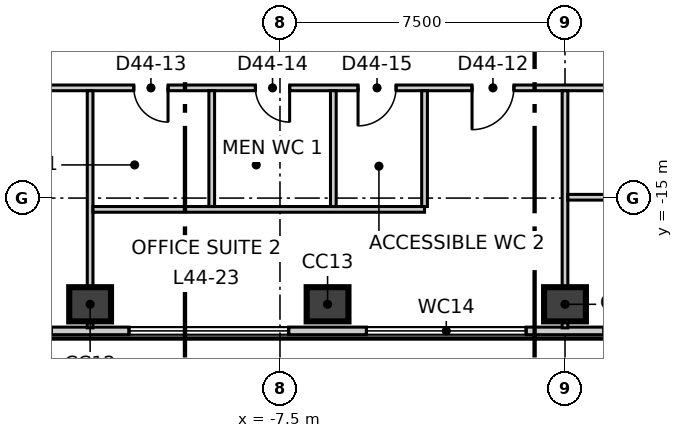
"""IFC4 building model, lengths in metres.
Left out: names, types, materials, properties, quantities, classifications, styles, units other than length and angle.
Written with IfcOpenShell. Run it as: python <this file> out.ifc"""

import sys

from ifc_helpers import new_model, si_unit, direction, frame, frame_2d, origin, origin_2d, place, context, subcontext, project, spatial, rectangle, extrude, element, fill, save


model = new_model("IFC4")
c1 = context("Model", 3, precision=1e-05, world=origin(), true_north=direction((0.0, 1.0)))
c2 = subcontext(c1, "Body", "Model", "MODEL_VIEW")
j1 = project(units=[si_unit("LENGTHUNIT", "METRE"), si_unit("PLANEANGLEUNIT", "RADIAN")], contexts=[c1])
p1 = place(None, origin())
s1 = spatial("IfcSite", under=j1, at=p1, CompositionType="ELEMENT")
p2 = place(p1, origin())
s2 = spatial("IfcBuilding", under=s1, at=p2, CompositionType="ELEMENT")
p3 = place(p2, frame((0.0, 0.0, 191.3)))
s3 = spatial("IfcBuildingStorey", under=s2, at=p3, CompositionType="ELEMENT", Elevation=191.3)
for number, where, z_axis, x_axis in (
    (1, (-12.496, -17.795, -0.3), (0.0, 0.0, 1.0), (1.0, 0.0, 0.0)),
    (2, (-6.248, -17.795, -0.3), (0.0, 0.0, 1.0), (1.0, 0.0, 0.0)),
    (3, (0.0, -17.795, -0.3), (0.0, 0.0, 1.0), (1.0, 0.0, 0.0)),
):
    element("IfcColumn", number, at=place(p3, frame(where, z_axis=z_axis, x_axis=x_axis)), inside=s3, PredefinedType="COLUMN", context=c2, shape_type="SweptSolid", body=[
        extrude(rectangle(XDim=1.1, YDim=0.9, at=origin_2d()), origin(), (0.0, 0.0, 1.0), 4.0),
    ])
p4 = place(p3, frame((-2.869, 32.02, 0.0), z_axis=(0.0, 0.0, 1.0), x_axis=(-0.500006930241, -0.866021402571, 0.0)))
e4 = element("IfcWall", 4, at=p4, inside=s3, PredefinedType="ELEMENTEDWALL", context=c2, shape_type="SweptSolid", body=[
    extrude(rectangle(XDim=52.572, YDim=0.2, at=frame_2d((26.286, 0.0))), origin(), (0.0, 0.0, 1.0), 3.7),
])
p5 = place(p4, frame((2.327, 0.0, 0.9)))
e5 = element("IfcOpeningElement", 5, at=p5, cuts=e4, PredefinedType="OPENING", context=c2, shape_type="SweptSolid", body=[
    extrude(rectangle(XDim=4.2, YDim=2.5, at=frame_2d((2.1, 1.25))), frame((0.0, 0.11, 0.0), z_axis=(0.0, -1.0, 0.0), x_axis=(1.0, 0.0, 0.0)), (0.0, 0.0, 1.0), 0.22),
])
p6 = place(p4, frame((8.575, 0.0, 0.9)))
e6 = element("IfcOpeningElement", 6, at=p6, cuts=e4, PredefinedType="OPENING", context=c2, shape_type="SweptSolid", body=[
    extrude(rectangle(XDim=4.2, YDim=2.5, at=frame_2d((2.1, 1.25))), frame((0.0, 0.11, 0.0), z_axis=(0.0, -1.0, 0.0), x_axis=(1.0, 0.0, 0.0)), (0.0, 0.0, 1.0), 0.22),
])
p7 = place(p4, frame((14.823, 0.0, 0.9)))
e7 = element("IfcOpeningElement", 7, at=p7, cuts=e4, PredefinedType="OPENING", context=c2, shape_type="SweptSolid", body=[
    extrude(rectangle(XDim=4.2, YDim=2.5, at=frame_2d((2.1, 1.25))), frame((0.0, 0.11, 0.0), z_axis=(0.0, -1.0, 0.0), x_axis=(1.0, 0.0, 0.0)), (0.0, 0.0, 1.0), 0.22),
])
p8 = place(p4, frame((21.071, 0.0, 0.9)))
e8 = element("IfcOpeningElement", 8, at=p8, cuts=e4, PredefinedType="OPENING", context=c2, shape_type="SweptSolid", body=[
    extrude(rectangle(XDim=4.2, YDim=2.5, at=frame_2d((2.1, 1.25))), frame((0.0, 0.11, 0.0), z_axis=(0.0, -1.0, 0.0), x_axis=(1.0, 0.0, 0.0)), (0.0, 0.0, 1.0), 0.22),
])
p9 = place(p4, frame((27.319, 0.0, 0.9)))
e9 = element("IfcOpeningElement", 9, at=p9, cuts=e4, PredefinedType="OPENING", context=c2, shape_type="SweptSolid", body=[
    extrude(rectangle(XDim=4.2, YDim=2.5, at=frame_2d((2.1, 1.25))), frame((0.0, 0.11, 0.0), z_axis=(0.0, -1.0, 0.0), x_axis=(1.0, 0.0, 0.0)), (0.0, 0.0, 1.0), 0.22),
])
p10 = place(p4, frame((33.568, 0.0, 0.9)))
e10 = element("IfcOpeningElement", 10, at=p10, cuts=e4, PredefinedType="OPENING", context=c2, shape_type="SweptSolid", body=[
    extrude(rectangle(XDim=4.2, YDim=2.5, at=frame_2d((2.1, 1.25))), frame((0.0, 0.11, 0.0), z_axis=(0.0, -1.0, 0.0), x_axis=(1.0, 0.0, 0.0)), (0.0, 0.0, 1.0), 0.22),
])
p11 = place(p4, frame((39.816, 0.0, 0.9)))
e11 = element("IfcOpeningElement", 11, at=p11, cuts=e4, PredefinedType="OPENING", context=c2, shape_type="SweptSolid", body=[
    extrude(rectangle(XDim=4.2, YDim=2.5, at=frame_2d((2.1, 1.25))), frame((0.0, 0.11, 0.0), z_axis=(0.0, -1.0, 0.0), x_axis=(1.0, 0.0, 0.0)), (0.0, 0.0, 1.0), 0.22),
])
p12 = place(p4, frame((46.064, 0.0, 0.9)))
e12 = element("IfcOpeningElement", 12, at=p12, cuts=e4, PredefinedType="OPENING", context=c2, shape_type="SweptSolid", body=[
    extrude(rectangle(XDim=4.2, YDim=2.5, at=frame_2d((2.1, 1.25))), frame((0.0, 0.11, 0.0), z_axis=(0.0, -1.0, 0.0), x_axis=(1.0, 0.0, 0.0)), (0.0, 0.0, 1.0), 0.22),
])
p13 = place(p3, frame((-26.296, -18.495, 0.0), z_axis=(0.0, 0.0, 1.0), x_axis=(1.0, 0.0, 0.0)))
e13 = element("IfcWall", 13, at=p13, inside=s3, PredefinedType="ELEMENTEDWALL", context=c2, shape_type="SweptSolid", body=[
    extrude(rectangle(XDim=52.572, YDim=0.2, at=frame_2d((26.286, 0.0))), origin(), (0.0, 0.0, 1.0), 3.7),
])
p14 = place(p13, frame((2.327, 0.0, 0.9)))
e14 = element("IfcOpeningElement", 14, at=p14, cuts=e13, PredefinedType="OPENING", context=c2, shape_type="SweptSolid", body=[
    extrude(rectangle(XDim=4.2, YDim=2.5, at=frame_2d((2.1, 1.25))), frame((0.0, 0.11, 0.0), z_axis=(0.0, -1.0, 0.0), x_axis=(1.0, 0.0, 0.0)), (0.0, 0.0, 1.0), 0.22),
])
p15 = place(p13, frame((8.575, 0.0, 0.9)))
e15 = element("IfcOpeningElement", 15, at=p15, cuts=e13, PredefinedType="OPENING", context=c2, shape_type="SweptSolid", body=[
    extrude(rectangle(XDim=4.2, YDim=2.5, at=frame_2d((2.1, 1.25))), frame((0.0, 0.11, 0.0), z_axis=(0.0, -1.0, 0.0), x_axis=(1.0, 0.0, 0.0)), (0.0, 0.0, 1.0), 0.22),
])
p16 = place(p13, frame((14.824, 0.0, 0.9)))
e16 = element("IfcOpeningElement", 16, at=p16, cuts=e13, PredefinedType="OPENING", context=c2, shape_type="SweptSolid", body=[
    extrude(rectangle(XDim=4.2, YDim=2.5, at=frame_2d((2.1, 1.25))), frame((0.0, 0.11, 0.0), z_axis=(0.0, -1.0, 0.0), x_axis=(1.0, 0.0, 0.0)), (0.0, 0.0, 1.0), 0.22),
])
p17 = place(p13, frame((21.072, 0.0, 0.9)))
e17 = element("IfcOpeningElement", 17, at=p17, cuts=e13, PredefinedType="OPENING", context=c2, shape_type="SweptSolid", body=[
    extrude(rectangle(XDim=4.2, YDim=2.5, at=frame_2d((2.1, 1.25))), frame((0.0, 0.11, 0.0), z_axis=(0.0, -1.0, 0.0), x_axis=(1.0, 0.0, 0.0)), (0.0, 0.0, 1.0), 0.22),
])
p18 = place(p13, frame((27.32, 0.0, 0.9)))
e18 = element("IfcOpeningElement", 18, at=p18, cuts=e13, PredefinedType="OPENING", context=c2, shape_type="SweptSolid", body=[
    extrude(rectangle(XDim=4.2, YDim=2.5, at=frame_2d((2.1, 1.25))), frame((0.0, 0.11, 0.0), z_axis=(0.0, -1.0, 0.0), x_axis=(1.0, 0.0, 0.0)), (0.0, 0.0, 1.0), 0.22),
])
p19 = place(p13, frame((33.568, 0.0, 0.9)))
e19 = element("IfcOpeningElement", 19, at=p19, cuts=e13, PredefinedType="OPENING", context=c2, shape_type="SweptSolid", body=[
    extrude(rectangle(XDim=4.2, YDim=2.5, at=frame_2d((2.1, 1.25))), frame((0.0, 0.11, 0.0), z_axis=(0.0, -1.0, 0.0), x_axis=(1.0, 0.0, 0.0)), (0.0, 0.0, 1.0), 0.22),
])
p20 = place(p13, frame((39.817, 0.0, 0.9)))
e20 = element("IfcOpeningElement", 20, at=p20, cuts=e13, PredefinedType="OPENING", context=c2, shape_type="SweptSolid", body=[
    extrude(rectangle(XDim=4.2, YDim=2.5, at=frame_2d((2.1, 1.25))), frame((0.0, 0.11, 0.0), z_axis=(0.0, -1.0, 0.0), x_axis=(1.0, 0.0, 0.0)), (0.0, 0.0, 1.0), 0.22),
])
p21 = place(p13, frame((46.065, 0.0, 0.9)))
e21 = element("IfcOpeningElement", 21, at=p21, cuts=e13, PredefinedType="OPENING", context=c2, shape_type="SweptSolid", body=[
    extrude(rectangle(XDim=4.2, YDim=2.5, at=frame_2d((2.1, 1.25))), frame((0.0, 0.11, 0.0), z_axis=(0.0, -1.0, 0.0), x_axis=(1.0, 0.0, 0.0)), (0.0, 0.0, 1.0), 0.22),
])
p22 = place(p3, frame((-20.882, -11.969, 0.0), z_axis=(0.0, 0.0, 1.0), x_axis=(0.499998738735, 0.866026131975, 0.0)))
e22 = element("IfcWall", 22, at=p22, inside=s3, PredefinedType="PARTITIONING", context=c2, shape_type="SweptSolid", body=[
    extrude(rectangle(XDim=41.764, YDim=0.15, at=frame_2d((20.882, 0.0))), origin(), (0.0, 0.0, 1.0), 3.7),
])
p23 = place(p22, frame((37.014, 0.0, 0.0)))
e23 = element("IfcOpeningElement", 23, at=p23, cuts=e22, PredefinedType="OPENING", context=c2, shape_type="SweptSolid", body=[
    extrude(rectangle(XDim=1.0, YDim=2.1, at=frame_2d((0.5, 1.05))), frame((0.0, 0.085, 0.0), z_axis=(0.0, -1.0, 0.0), x_axis=(1.0, 0.0, 0.0)), (0.0, 0.0, 1.0), 0.17),
])
p24 = place(p22, frame((29.653, 0.0, 0.0)))
e24 = element("IfcOpeningElement", 24, at=p24, cuts=e22, PredefinedType="OPENING", context=c2, shape_type="SweptSolid", body=[
    extrude(rectangle(XDim=1.0, YDim=2.1, at=frame_2d((0.5, 1.05))), frame((0.0, 0.085, 0.0), z_axis=(0.0, -1.0, 0.0), x_axis=(1.0, 0.0, 0.0)), (0.0, 0.0, 1.0), 0.17),
])
p25 = place(p22, frame((23.405, 0.0, 0.0)))
e25 = element("IfcOpeningElement", 25, at=p25, cuts=e22, PredefinedType="OPENING", context=c2, shape_type="SweptSolid", body=[
    extrude(rectangle(XDim=1.0, YDim=2.1, at=frame_2d((0.5, 1.05))), frame((0.0, 0.085, 0.0), z_axis=(0.0, -1.0, 0.0), x_axis=(1.0, 0.0, 0.0)), (0.0, 0.0, 1.0), 0.17),
])
p26 = place(p22, frame((9.657, 0.0, 0.0)))
e26 = element("IfcOpeningElement", 26, at=p26, cuts=e22, PredefinedType="OPENING", context=c2, shape_type="SweptSolid", body=[
    extrude(rectangle(XDim=1.1, YDim=2.1, at=frame_2d((0.55, 1.05))), frame((0.0, 0.085, 0.0), z_axis=(0.0, -1.0, 0.0), x_axis=(1.0, 0.0, 0.0)), (0.0, 0.0, 1.0), 0.17),
])
p27 = place(p22, frame((18.757, 0.0, 0.0)))
e27 = element("IfcOpeningElement", 27, at=p27, cuts=e22, PredefinedType="OPENING", context=c2, shape_type="SweptSolid", body=[
    extrude(rectangle(XDim=0.9, YDim=2.1, at=frame_2d((0.45, 1.05))), frame((0.0, 0.085, 0.0), z_axis=(0.0, -1.0, 0.0), x_axis=(1.0, 0.0, 0.0)), (0.0, 0.0, 1.0), 0.17),
])
p28 = place(p22, frame((15.557, 0.0, 0.0)))
e28 = element("IfcOpeningElement", 28, at=p28, cuts=e22, PredefinedType="OPENING", context=c2, shape_type="SweptSolid", body=[
    extrude(rectangle(XDim=0.9, YDim=2.1, at=frame_2d((0.45, 1.05))), frame((0.0, 0.085, 0.0), z_axis=(0.0, -1.0, 0.0), x_axis=(1.0, 0.0, 0.0)), (0.0, 0.0, 1.0), 0.17),
])
p29 = place(p22, frame((12.657, 0.0, 0.0)))
e29 = element("IfcOpeningElement", 29, at=p29, cuts=e22, PredefinedType="OPENING", context=c2, shape_type="SweptSolid", body=[
    extrude(rectangle(XDim=1.0, YDim=2.1, at=frame_2d((0.5, 1.05))), frame((0.0, 0.085, 0.0), z_axis=(0.0, -1.0, 0.0), x_axis=(1.0, 0.0, 0.0)), (0.0, 0.0, 1.0), 0.17),
])
p30 = place(p22, frame((3.56, 0.0, 0.0)))
e30 = element("IfcOpeningElement", 30, at=p30, cuts=e22, PredefinedType="OPENING", context=c2, shape_type="SweptSolid", body=[
    extrude(rectangle(XDim=1.1, YDim=2.1, at=frame_2d((0.55, 1.05))), frame((0.0, 0.085, 0.0), z_axis=(0.0, -1.0, 0.0), x_axis=(1.0, 0.0, 0.0)), (0.0, 0.0, 1.0), 0.17),
])
p31 = place(p3, frame((-20.808, -12.1, 0.0), z_axis=(0.0, 0.0, 1.0), x_axis=(1.0, 0.0, 0.0)))
e31 = element("IfcWall", 31, at=p31, inside=s3, PredefinedType="PARTITIONING", context=c2, shape_type="SweptSolid", body=[
    extrude(rectangle(XDim=41.766, YDim=0.15, at=frame_2d((20.883, 0.0))), origin(), (0.0, 0.0, 1.0), 3.7),
])
p32 = place(p31, frame((3.5, 0.0, 0.0)))
e32 = element("IfcOpeningElement", 32, at=p32, cuts=e31, PredefinedType="OPENING", context=c2, shape_type="SweptSolid", body=[
    extrude(rectangle(XDim=1.1, YDim=2.1, at=frame_2d((0.55, 1.05))), frame((0.0, 0.085, 0.0), z_axis=(0.0, -1.0, 0.0), x_axis=(1.0, 0.0, 0.0)), (0.0, 0.0, 1.0), 0.17),
])
p33 = place(p31, frame((18.362, 0.0, 0.0)))
e33 = element("IfcOpeningElement", 33, at=p33, cuts=e31, PredefinedType="OPENING", context=c2, shape_type="SweptSolid", body=[
    extrude(rectangle(XDim=1.1, YDim=2.1, at=frame_2d((0.55, 1.05))), frame((0.0, 0.085, 0.0), z_axis=(0.0, -1.0, 0.0), x_axis=(1.0, 0.0, 0.0)), (0.0, 0.0, 1.0), 0.17),
])
p34 = place(p31, frame((9.462, 0.0, 0.0)))
e34 = element("IfcOpeningElement", 34, at=p34, cuts=e31, PredefinedType="OPENING", context=c2, shape_type="SweptSolid", body=[
    extrude(rectangle(XDim=0.9, YDim=2.1, at=frame_2d((0.45, 1.05))), frame((0.0, 0.085, 0.0), z_axis=(0.0, -1.0, 0.0), x_axis=(1.0, 0.0, 0.0)), (0.0, 0.0, 1.0), 0.17),
])
p35 = place(p31, frame((12.662, 0.0, 0.0)))
e35 = element("IfcOpeningElement", 35, at=p35, cuts=e31, PredefinedType="OPENING", context=c2, shape_type="SweptSolid", body=[
    extrude(rectangle(XDim=0.9, YDim=2.1, at=frame_2d((0.45, 1.05))), frame((0.0, 0.085, 0.0), z_axis=(0.0, -1.0, 0.0), x_axis=(1.0, 0.0, 0.0)), (0.0, 0.0, 1.0), 0.17),
])
p36 = place(p31, frame((15.362, 0.0, 0.0)))
e36 = element("IfcOpeningElement", 36, at=p36, cuts=e31, PredefinedType="OPENING", context=c2, shape_type="SweptSolid", body=[
    extrude(rectangle(XDim=1.0, YDim=2.1, at=frame_2d((0.5, 1.05))), frame((0.0, 0.085, 0.0), z_axis=(0.0, -1.0, 0.0), x_axis=(1.0, 0.0, 0.0)), (0.0, 0.0, 1.0), 0.17),
])
p37 = place(p31, frame((26.458, 0.0, 0.0)))
e37 = element("IfcOpeningElement", 37, at=p37, cuts=e31, PredefinedType="OPENING", context=c2, shape_type="SweptSolid", body=[
    extrude(rectangle(XDim=1.1, YDim=2.1, at=frame_2d((0.55, 1.05))), frame((0.0, 0.085, 0.0), z_axis=(0.0, -1.0, 0.0), x_axis=(1.0, 0.0, 0.0)), (0.0, 0.0, 1.0), 0.17),
])
p38 = place(p31, frame((36.955, 0.0, 0.0)))
e38 = element("IfcOpeningElement", 38, at=p38, cuts=e31, PredefinedType="OPENING", context=c2, shape_type="SweptSolid", body=[
    extrude(rectangle(XDim=1.1, YDim=2.1, at=frame_2d((0.55, 1.05))), frame((0.0, 0.085, 0.0), z_axis=(0.0, -1.0, 0.0), x_axis=(1.0, 0.0, 0.0)), (0.0, 0.0, 1.0), 0.17),
])
p39 = place(p3, frame((-12.496, -18.415, 0.0), z_axis=(0.0, 0.0, 1.0), x_axis=(0.0, 1.0, 0.0)))
e39 = element("IfcWall", 39, at=p39, inside=s3, PredefinedType="PARTITIONING", context=c2, shape_type="SweptSolid", body=[
    extrude(rectangle(XDim=6.24, YDim=0.15, at=frame_2d((3.12, 0.0))), origin(), (0.0, 0.0, 1.0), 3.7),
])
p40 = place(p3, frame((-12.421, -15.297, 0.0), z_axis=(0.0, 0.0, 1.0), x_axis=(1.0, 0.0, 0.0)))
e40 = element("IfcWall", 40, at=p40, inside=s3, PredefinedType="PARTITIONING", context=c2, shape_type="SweptSolid", body=[
    extrude(rectangle(XDim=8.725, YDim=0.15, at=frame_2d((4.362, 0.0))), origin(), (0.0, 0.0, 1.0), 3.7),
])
for number, where, z_axis, x_axis in (
    (41, (-9.296, -15.222, 0.0), (0.0, 0.0, 1.0), (0.0, 1.0, 0.0)),
    (42, (-3.696, -15.222, 0.0), (0.0, 0.0, 1.0), (0.0, 1.0, 0.0)),
    (43, (-6.096, -15.222, 0.0), (0.0, 0.0, 1.0), (0.0, 1.0, 0.0)),
):
    element("IfcWall", number, at=place(p3, frame(where, z_axis=z_axis, x_axis=x_axis)), inside=s3, PredefinedType="PARTITIONING", context=c2, shape_type="SweptSolid", body=[
        extrude(rectangle(XDim=3.047, YDim=0.15, at=frame_2d((1.523, 0.0))), origin(), (0.0, 0.0, 1.0), 3.7),
    ])
p41 = place(p3, frame((0.0, -18.415, 0.0), z_axis=(0.0, 0.0, 1.0), x_axis=(0.0, 1.0, 0.0)))
e44 = element("IfcWall", 44, at=p41, inside=s3, PredefinedType="PARTITIONING", context=c2, shape_type="SweptSolid", body=[
    extrude(rectangle(XDim=6.24, YDim=0.15, at=frame_2d((3.12, 0.0))), origin(), (0.0, 0.0, 1.0), 3.2),
])
p42 = place(p3, frame((0.075, 24.07, 0.0), z_axis=(0.0, 0.0, 1.0), x_axis=(0.49999939571, -0.866025752671, 0.0)))
e45 = element("IfcWall", 45, at=p42, inside=s3, PredefinedType="PARTITIONING", context=c2, shape_type="SweptSolid", body=[
    extrude(rectangle(XDim=41.614, YDim=0.15, at=frame_2d((20.807, 0.0))), origin(), (0.0, 0.0, 1.0), 3.7),
])
p43 = place(p42, frame((37.015, 0.0, 0.0)))
e46 = element("IfcOpeningElement", 46, at=p43, cuts=e45, PredefinedType="OPENING", context=c2, shape_type="SweptSolid", body=[
    extrude(rectangle(XDim=1.1, YDim=2.1, at=frame_2d((0.55, 1.05))), frame((0.0, 0.085, 0.0), z_axis=(0.0, -1.0, 0.0), x_axis=(1.0, 0.0, 0.0)), (0.0, 0.0, 1.0), 0.17),
])
p44 = place(p42, frame((25.154, 0.0, 0.0)))
e47 = element("IfcOpeningElement", 47, at=p44, cuts=e45, PredefinedType="OPENING", context=c2, shape_type="SweptSolid", body=[
    extrude(rectangle(XDim=1.0, YDim=2.1, at=frame_2d((0.5, 1.05))), frame((0.0, 0.085, 0.0), z_axis=(0.0, -1.0, 0.0), x_axis=(1.0, 0.0, 0.0)), (0.0, 0.0, 1.0), 0.17),
])
p45 = place(p42, frame((31.454, 0.0, 0.0)))
e48 = element("IfcOpeningElement", 48, at=p45, cuts=e45, PredefinedType="OPENING", context=c2, shape_type="SweptSolid", body=[
    extrude(rectangle(XDim=0.9, YDim=2.1, at=frame_2d((0.45, 1.05))), frame((0.0, 0.085, 0.0), z_axis=(0.0, -1.0, 0.0), x_axis=(1.0, 0.0, 0.0)), (0.0, 0.0, 1.0), 0.17),
])
p46 = place(p42, frame((17.157, 0.0, 0.0)))
e49 = element("IfcOpeningElement", 49, at=p46, cuts=e45, PredefinedType="OPENING", context=c2, shape_type="SweptSolid", body=[
    extrude(rectangle(XDim=1.0, YDim=2.1, at=frame_2d((0.5, 1.05))), frame((0.0, 0.085, 0.0), z_axis=(0.0, -1.0, 0.0), x_axis=(1.0, 0.0, 0.0)), (0.0, 0.0, 1.0), 0.17),
])
p47 = place(p42, frame((6.609, 0.0, 0.0)))
e50 = element("IfcOpeningElement", 50, at=p47, cuts=e45, PredefinedType="OPENING", context=c2, shape_type="SweptSolid", body=[
    extrude(rectangle(XDim=1.1, YDim=2.1, at=frame_2d((0.55, 1.05))), frame((0.0, 0.085, 0.0), z_axis=(0.0, -1.0, 0.0), x_axis=(1.0, 0.0, 0.0)), (0.0, 0.0, 1.0), 0.17),
])
p48 = place(p3, frame((0.075, -14.978, 0.0), z_axis=(0.0, 0.0, 1.0), x_axis=(1.0, 0.0, 0.0)))
e51 = element("IfcWall", 51, at=p48, inside=s3, PredefinedType="PARTITIONING", context=c2, shape_type="SweptSolid", body=[
    extrude(rectangle(XDim=12.347, YDim=0.15, at=frame_2d((6.174, 0.0))), origin(), (0.0, 0.0, 1.0), 3.7),
])
p49 = place(p48, frame((5.675, 0.0, 0.0)))
e52 = element("IfcOpeningElement", 52, at=p49, cuts=e51, PredefinedType="OPENING", context=c2, shape_type="SweptSolid", body=[
    extrude(rectangle(XDim=1.0, YDim=2.1, at=frame_2d((0.5, 1.05))), frame((0.0, 0.085, 0.0), z_axis=(0.0, -1.0, 0.0), x_axis=(1.0, 0.0, 0.0)), (0.0, 0.0, 1.0), 0.17),
])
p50 = place(p16, origin())
e53 = element("IfcWindow", 53, at=p50, inside=s3, PartitioningType="SINGLE_PANEL", PredefinedType="WINDOW", context=c2, shape_type="SweptSolid", body=[
    extrude(rectangle(XDim=4.2, YDim=2.5, at=frame_2d((2.1, 1.25))), frame((0.0, 0.03, 0.0), z_axis=(0.0, -1.0, 0.0), x_axis=(1.0, 0.0, 0.0)), (0.0, 0.0, 1.0), 0.06),
])
fill(e16, e53)
p51 = place(p17, origin())
e54 = element("IfcWindow", 54, at=p51, inside=s3, PartitioningType="SINGLE_PANEL", PredefinedType="WINDOW", context=c2, shape_type="SweptSolid", body=[
    extrude(rectangle(XDim=4.2, YDim=2.5, at=frame_2d((2.1, 1.25))), frame((0.0, 0.03, 0.0), z_axis=(0.0, -1.0, 0.0), x_axis=(1.0, 0.0, 0.0)), (0.0, 0.0, 1.0), 0.06),
])
fill(e17, e54)
p52 = place(p33, origin())
e55 = element("IfcDoor", 55, at=p52, inside=s3, OperationType="SINGLE_SWING_LEFT", PredefinedType="DOOR", context=c2, shape_type="SweptSolid", body=[
    extrude(rectangle(XDim=1.1, YDim=2.1, at=frame_2d((0.55, 1.05))), frame((0.0, 0.025, 0.0), z_axis=(0.0, -1.0, 0.0), x_axis=(1.0, 0.0, 0.0)), (0.0, 0.0, 1.0), 0.05),
])
fill(e33, e55)
p53 = place(p34, origin())
e56 = element("IfcDoor", 56, at=p53, inside=s3, OperationType="SINGLE_SWING_RIGHT", PredefinedType="DOOR", context=c2, shape_type="SweptSolid", body=[
    extrude(rectangle(XDim=0.9, YDim=2.1, at=frame_2d((0.45, 1.05))), frame((0.0, 0.025, 0.0), z_axis=(0.0, -1.0, 0.0), x_axis=(1.0, 0.0, 0.0)), (0.0, 0.0, 1.0), 0.05),
])
fill(e34, e56)
p54 = place(p35, origin())
e57 = element("IfcDoor", 57, at=p54, inside=s3, OperationType="SINGLE_SWING_RIGHT", PredefinedType="DOOR", context=c2, shape_type="SweptSolid", body=[
    extrude(rectangle(XDim=0.9, YDim=2.1, at=frame_2d((0.45, 1.05))), frame((0.0, 0.025, 0.0), z_axis=(0.0, -1.0, 0.0), x_axis=(1.0, 0.0, 0.0)), (0.0, 0.0, 1.0), 0.05),
])
fill(e35, e57)
p55 = place(p36, origin())
e58 = element("IfcDoor", 58, at=p55, inside=s3, OperationType="SINGLE_SWING_LEFT", PredefinedType="DOOR", context=c2, shape_type="SweptSolid", body=[
    extrude(rectangle(XDim=1.0, YDim=2.1, at=frame_2d((0.5, 1.05))), frame((0.0, 0.025, 0.0), z_axis=(0.0, -1.0, 0.0), x_axis=(1.0, 0.0, 0.0)), (0.0, 0.0, 1.0), 0.05),
])
fill(e36, e58)
save(model, sys.argv[1])
